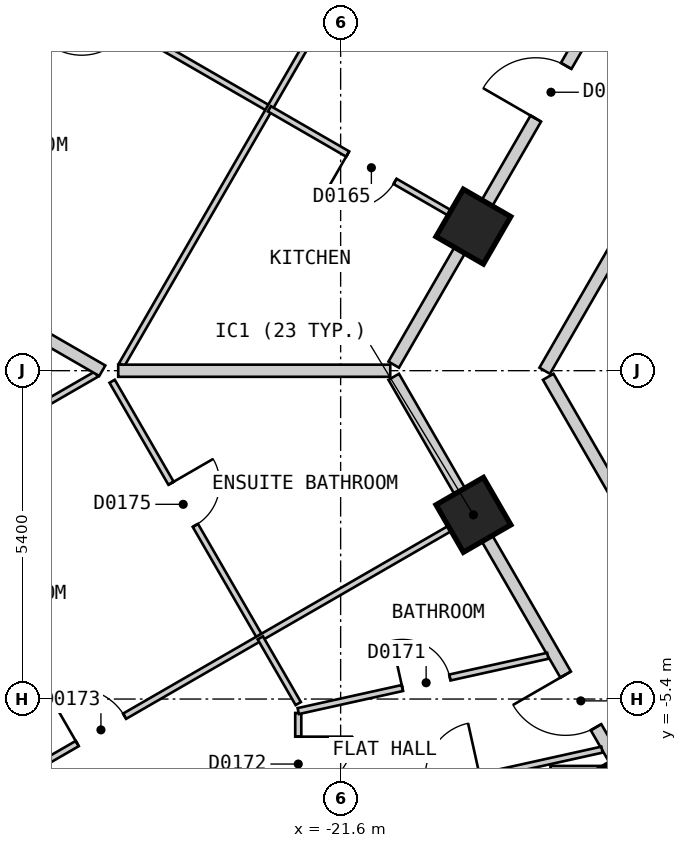
"""IFC4 building model, lengths in metres.
Left out: names, types, materials, properties, quantities, classifications, styles, units other than length and angle.
Written with IfcOpenShell. Run it as: python <this file> out.ifc"""

import sys

from ifc_helpers import new_model, si_unit, direction, frame, frame_2d, origin, origin_2d, place, context, subcontext, project, spatial, polyline, rectangle, outline, extrude, element, fill, save


model = new_model("IFC4")
c1 = context("Model", 3, precision=1e-05, world=origin(), true_north=direction((0.0, 1.0)))
c2 = subcontext(c1, "Body", "Model", "MODEL_VIEW")
j1 = project(units=[si_unit("LENGTHUNIT", "METRE"), si_unit("PLANEANGLEUNIT", "RADIAN")], contexts=[c1])
p1 = place(None, origin())
s1 = spatial("IfcSite", under=j1, at=p1, CompositionType="ELEMENT")
p2 = place(p1, origin())
s2 = spatial("IfcBuilding", under=s1, at=p2, CompositionType="ELEMENT")
p3 = place(p2, frame((0.0, 0.0, 29.4)))
s3 = spatial("IfcBuildingStorey", under=s2, at=p3, CompositionType="ELEMENT", Elevation=29.4)
for number, where, z_axis, x_axis in (
    (1, (-19.416, -2.371, 0.0), (0.0, 0.0, 1.0), (0.5, -0.866, 0.0)),
    (2, (-16.864, -6.791, 0.0), (0.0, 0.0, 1.0), (0.5, -0.866, 0.0)),
    (3, (-19.417, 2.369, 0.0), (0.0, 0.0, 1.0), (-0.5, -0.866, 0.0)),
):
    element("IfcColumn", number, at=place(p3, frame(where, z_axis=z_axis, x_axis=x_axis)), inside=s3, PredefinedType="COLUMN", context=c2, shape_type="SweptSolid", body=[
        extrude(rectangle(XDim=0.9, YDim=0.9, at=origin_2d()), origin(), (0.0, 0.0, 1.0), 3.0),
    ])
p4 = place(p3, frame((-17.71, 25.825, 0.0), z_axis=(0.0, 0.0, 1.0), x_axis=(-0.500001938803, -0.866024284413, 0.0)))
e4 = element("IfcWall", 4, at=p4, inside=s3, PredefinedType="SOLIDWALL", context=c2, shape_type="SweptSolid", body=[
    extrude(outline(polyline([(0.0, -0.15), (27.02, -0.15), (26.94, 0.15), (0.08, 0.15), (0.0, -0.15)])), origin(), (0.0, 0.0, 1.0), 2.7),
])
p5 = place(p4, frame((1.277, 0.0, 0.15)))
e5 = element("IfcOpeningElement", 5, at=p5, cuts=e4, PredefinedType="OPENING", context=c2, shape_type="SweptSolid", body=[
    extrude(rectangle(XDim=1.5, YDim=2.1, at=frame_2d((0.75, 1.05))), frame((0.0, 0.16, 0.0), z_axis=(0.0, -1.0, 0.0), x_axis=(1.0, 0.0, 0.0)), (0.0, 0.0, 1.0), 0.32),
])
p6 = place(p4, frame((3.829, 0.0, 0.15)))
e6 = element("IfcOpeningElement", 6, at=p6, cuts=e4, PredefinedType="OPENING", context=c2, shape_type="SweptSolid", body=[
    extrude(rectangle(XDim=1.5, YDim=2.1, at=frame_2d((0.75, 1.05))), frame((0.0, 0.16, 0.0), z_axis=(0.0, -1.0, 0.0), x_axis=(1.0, 0.0, 0.0)), (0.0, 0.0, 1.0), 0.32),
])
p7 = place(p4, frame((6.382, 0.0, 0.15)))
e7 = element("IfcOpeningElement", 7, at=p7, cuts=e4, PredefinedType="OPENING", context=c2, shape_type="SweptSolid", body=[
    extrude(rectangle(XDim=1.5, YDim=2.1, at=frame_2d((0.75, 1.05))), frame((0.0, 0.16, 0.0), z_axis=(0.0, -1.0, 0.0), x_axis=(1.0, 0.0, 0.0)), (0.0, 0.0, 1.0), 0.32),
])
p8 = place(p4, frame((8.933, 0.0, 0.15)))
e8 = element("IfcOpeningElement", 8, at=p8, cuts=e4, PredefinedType="OPENING", context=c2, shape_type="SweptSolid", body=[
    extrude(rectangle(XDim=1.5, YDim=2.1, at=frame_2d((0.75, 1.05))), frame((0.0, 0.16, 0.0), z_axis=(0.0, -1.0, 0.0), x_axis=(1.0, 0.0, 0.0)), (0.0, 0.0, 1.0), 0.32),
])
p9 = place(p4, frame((11.485, 0.0, 0.15)))
e9 = element("IfcOpeningElement", 9, at=p9, cuts=e4, PredefinedType="OPENING", context=c2, shape_type="SweptSolid", body=[
    extrude(rectangle(XDim=1.5, YDim=2.1, at=frame_2d((0.75, 1.05))), frame((0.0, 0.16, 0.0), z_axis=(0.0, -1.0, 0.0), x_axis=(1.0, 0.0, 0.0)), (0.0, 0.0, 1.0), 0.32),
])
p10 = place(p4, frame((14.037, 0.0, 0.15)))
e10 = element("IfcOpeningElement", 10, at=p10, cuts=e4, PredefinedType="OPENING", context=c2, shape_type="SweptSolid", body=[
    extrude(rectangle(XDim=1.5, YDim=2.1, at=frame_2d((0.75, 1.05))), frame((0.0, 0.16, 0.0), z_axis=(0.0, -1.0, 0.0), x_axis=(1.0, 0.0, 0.0)), (0.0, 0.0, 1.0), 0.32),
])
p11 = place(p4, frame((16.589, 0.0, 0.15)))
e11 = element("IfcOpeningElement", 11, at=p11, cuts=e4, PredefinedType="OPENING", context=c2, shape_type="SweptSolid", body=[
    extrude(rectangle(XDim=1.5, YDim=2.1, at=frame_2d((0.75, 1.05))), frame((0.0, 0.16, 0.0), z_axis=(0.0, -1.0, 0.0), x_axis=(1.0, 0.0, 0.0)), (0.0, 0.0, 1.0), 0.32),
])
p12 = place(p4, frame((19.141, 0.0, 0.15)))
e12 = element("IfcOpeningElement", 12, at=p12, cuts=e4, PredefinedType="OPENING", context=c2, shape_type="SweptSolid", body=[
    extrude(rectangle(XDim=1.5, YDim=2.1, at=frame_2d((0.75, 1.05))), frame((0.0, 0.16, 0.0), z_axis=(0.0, -1.0, 0.0), x_axis=(1.0, 0.0, 0.0)), (0.0, 0.0, 1.0), 0.32),
])
p13 = place(p4, frame((21.693, 0.0, 0.15)))
e13 = element("IfcOpeningElement", 13, at=p13, cuts=e4, PredefinedType="OPENING", context=c2, shape_type="SweptSolid", body=[
    extrude(rectangle(XDim=1.5, YDim=2.1, at=frame_2d((0.75, 1.05))), frame((0.0, 0.16, 0.0), z_axis=(0.0, -1.0, 0.0), x_axis=(1.0, 0.0, 0.0)), (0.0, 0.0, 1.0), 0.32),
])
p14 = place(p4, frame((24.244, 0.0, 0.15)))
e14 = element("IfcOpeningElement", 14, at=p14, cuts=e4, PredefinedType="OPENING", context=c2, shape_type="SweptSolid", body=[
    extrude(rectangle(XDim=1.5, YDim=2.1, at=frame_2d((0.75, 1.05))), frame((0.0, 0.16, 0.0), z_axis=(0.0, -1.0, 0.0), x_axis=(1.0, 0.0, 0.0)), (0.0, 0.0, 1.0), 0.32),
])
p15 = place(p3, frame((-31.22, -2.425, 0.0), z_axis=(0.0, 0.0, 1.0), x_axis=(0.500001938803, -0.866024284413, 0.0)))
e15 = element("IfcWall", 15, at=p15, inside=s3, PredefinedType="SOLIDWALL", context=c2, shape_type="SweptSolid", body=[
    extrude(outline(polyline([(0.0, -0.15), (27.02, -0.15), (26.94, 0.15), (0.08, 0.15), (0.0, -0.15)])), origin(), (0.0, 0.0, 1.0), 2.7),
])
p16 = place(p15, frame((1.277, 0.0, 0.15)))
e16 = element("IfcOpeningElement", 16, at=p16, cuts=e15, PredefinedType="OPENING", context=c2, shape_type="SweptSolid", body=[
    extrude(rectangle(XDim=1.5, YDim=2.1, at=frame_2d((0.75, 1.05))), frame((0.0, 0.16, 0.0), z_axis=(0.0, -1.0, 0.0), x_axis=(1.0, 0.0, 0.0)), (0.0, 0.0, 1.0), 0.32),
])
p17 = place(p15, frame((3.829, 0.0, 0.15)))
e17 = element("IfcOpeningElement", 17, at=p17, cuts=e15, PredefinedType="OPENING", context=c2, shape_type="SweptSolid", body=[
    extrude(rectangle(XDim=1.5, YDim=2.1, at=frame_2d((0.75, 1.05))), frame((0.0, 0.16, 0.0), z_axis=(0.0, -1.0, 0.0), x_axis=(1.0, 0.0, 0.0)), (0.0, 0.0, 1.0), 0.32),
])
p18 = place(p15, frame((6.382, 0.0, 0.15)))
e18 = element("IfcOpeningElement", 18, at=p18, cuts=e15, PredefinedType="OPENING", context=c2, shape_type="SweptSolid", body=[
    extrude(rectangle(XDim=1.5, YDim=2.1, at=frame_2d((0.75, 1.05))), frame((0.0, 0.16, 0.0), z_axis=(0.0, -1.0, 0.0), x_axis=(1.0, 0.0, 0.0)), (0.0, 0.0, 1.0), 0.32),
])
p19 = place(p15, frame((8.933, 0.0, 0.15)))
e19 = element("IfcOpeningElement", 19, at=p19, cuts=e15, PredefinedType="OPENING", context=c2, shape_type="SweptSolid", body=[
    extrude(rectangle(XDim=1.5, YDim=2.1, at=frame_2d((0.75, 1.05))), frame((0.0, 0.16, 0.0), z_axis=(0.0, -1.0, 0.0), x_axis=(1.0, 0.0, 0.0)), (0.0, 0.0, 1.0), 0.32),
])
p20 = place(p15, frame((11.485, 0.0, 0.15)))
e20 = element("IfcOpeningElement", 20, at=p20, cuts=e15, PredefinedType="OPENING", context=c2, shape_type="SweptSolid", body=[
    extrude(rectangle(XDim=1.5, YDim=2.1, at=frame_2d((0.75, 1.05))), frame((0.0, 0.16, 0.0), z_axis=(0.0, -1.0, 0.0), x_axis=(1.0, 0.0, 0.0)), (0.0, 0.0, 1.0), 0.32),
])
p21 = place(p15, frame((14.037, 0.0, 0.15)))
e21 = element("IfcOpeningElement", 21, at=p21, cuts=e15, PredefinedType="OPENING", context=c2, shape_type="SweptSolid", body=[
    extrude(rectangle(XDim=1.5, YDim=2.1, at=frame_2d((0.75, 1.05))), frame((0.0, 0.16, 0.0), z_axis=(0.0, -1.0, 0.0), x_axis=(1.0, 0.0, 0.0)), (0.0, 0.0, 1.0), 0.32),
])
p22 = place(p15, frame((16.589, 0.0, 0.15)))
e22 = element("IfcOpeningElement", 22, at=p22, cuts=e15, PredefinedType="OPENING", context=c2, shape_type="SweptSolid", body=[
    extrude(rectangle(XDim=1.5, YDim=2.1, at=frame_2d((0.75, 1.05))), frame((0.0, 0.16, 0.0), z_axis=(0.0, -1.0, 0.0), x_axis=(1.0, 0.0, 0.0)), (0.0, 0.0, 1.0), 0.32),
])
p23 = place(p15, frame((19.141, 0.0, 0.15)))
e23 = element("IfcOpeningElement", 23, at=p23, cuts=e15, PredefinedType="OPENING", context=c2, shape_type="SweptSolid", body=[
    extrude(rectangle(XDim=1.5, YDim=2.1, at=frame_2d((0.75, 1.05))), frame((0.0, 0.16, 0.0), z_axis=(0.0, -1.0, 0.0), x_axis=(1.0, 0.0, 0.0)), (0.0, 0.0, 1.0), 0.32),
])
p24 = place(p15, frame((21.693, 0.0, 0.15)))
e24 = element("IfcOpeningElement", 24, at=p24, cuts=e15, PredefinedType="OPENING", context=c2, shape_type="SweptSolid", body=[
    extrude(rectangle(XDim=1.5, YDim=2.1, at=frame_2d((0.75, 1.05))), frame((0.0, 0.16, 0.0), z_axis=(0.0, -1.0, 0.0), x_axis=(1.0, 0.0, 0.0)), (0.0, 0.0, 1.0), 0.32),
])
p25 = place(p15, frame((24.244, 0.0, 0.15)))
e25 = element("IfcOpeningElement", 25, at=p25, cuts=e15, PredefinedType="OPENING", context=c2, shape_type="SweptSolid", body=[
    extrude(rectangle(XDim=1.5, YDim=2.1, at=frame_2d((0.75, 1.05))), frame((0.0, 0.16, 0.0), z_axis=(0.0, -1.0, 0.0), x_axis=(1.0, 0.0, 0.0)), (0.0, 0.0, 1.0), 0.32),
])
p26 = place(p3, frame((-18.186, -0.101, 0.0), z_axis=(0.0, 0.0, 1.0), x_axis=(0.499997591167, -0.86602679452, 0.0)))
e26 = element("IfcWall", 26, at=p26, inside=s3, PredefinedType="PARTITIONING", context=c2, shape_type="SweptSolid", body=[
    extrude(rectangle(XDim=5.172, YDim=0.2, at=frame_2d((2.586, 0.0))), origin(), (0.0, 0.0, 1.0), 2.7),
])
p27 = place(p3, frame((-20.727, -0.101, 0.0), z_axis=(0.0, 0.0, 1.0), x_axis=(0.500065652488, -0.865987495984, 0.0)))
e27 = element("IfcWall", 27, at=p27, inside=s3, PredefinedType="PARTITIONING", context=c2, shape_type="SweptSolid", body=[
    extrude(rectangle(XDim=7.389, YDim=0.2, at=frame_2d((3.695, 0.0))), origin(), (0.0, 0.0, 1.0), 2.7),
])
p28 = place(p27, frame((5.654, 0.0, 0.0)))
e28 = element("IfcOpeningElement", 28, at=p28, cuts=e27, PredefinedType="OPENING", context=c2, shape_type="SweptSolid", body=[
    extrude(rectangle(XDim=1.0, YDim=2.1, at=frame_2d((0.5, 1.05))), frame((0.0, 0.11, 0.0), z_axis=(0.0, -1.0, 0.0), x_axis=(1.0, 0.0, 0.0)), (0.0, 0.0, 1.0), 0.22),
])
p29 = place(p3, frame((-18.15, -6.6, 0.0), z_axis=(0.0, 0.0, 1.0), x_axis=(1.0, 0.0, 0.0)))
e29 = element("IfcWall", 29, at=p29, inside=s3, PredefinedType="PARTITIONING", context=c2, shape_type="SweptSolid", body=[
    extrude(rectangle(XDim=1.176, YDim=0.2, at=frame_2d((0.588, 0.0))), origin(), (0.0, 0.0, 1.0), 2.7),
])
p30 = place(p3, frame((-18.244, -0.001, 0.0), z_axis=(0.0, 0.0, 1.0), x_axis=(0.499962999376, 0.866046765051, 0.0)))
e30 = element("IfcWall", 30, at=p30, inside=s3, PredefinedType="PARTITIONING", context=c2, shape_type="SweptSolid", body=[
    extrude(rectangle(XDim=18.245, YDim=0.2, at=frame_2d((9.123, 0.0))), origin(), (0.0, 0.0, 1.0), 2.7),
])
p31 = place(p30, frame((8.672, 0.0, 0.0)))
e31 = element("IfcOpeningElement", 31, at=p31, cuts=e30, PredefinedType="OPENING", context=c2, shape_type="SweptSolid", body=[
    extrude(rectangle(XDim=0.9, YDim=2.1, at=frame_2d((0.45, 1.05))), frame((0.0, 0.11, 0.0), z_axis=(0.0, -1.0, 0.0), x_axis=(1.0, 0.0, 0.0)), (0.0, 0.0, 1.0), 0.22),
])
p32 = place(p3, frame((-20.727, 0.099, 0.0), z_axis=(0.0, 0.0, 1.0), x_axis=(0.499993204491, 0.866029327138, 0.0)))
e32 = element("IfcWall", 32, at=p32, inside=s3, PredefinedType="PARTITIONING", context=c2, shape_type="SweptSolid", body=[
    extrude(rectangle(XDim=20.554, YDim=0.2, at=frame_2d((10.277, 0.0))), origin(), (0.0, 0.0, 1.0), 2.7),
])
p33 = place(p32, frame((14.88, 0.0, 0.0)))
e33 = element("IfcOpeningElement", 33, at=p33, cuts=e32, PredefinedType="OPENING", context=c2, shape_type="SweptSolid", body=[
    extrude(rectangle(XDim=1.0, YDim=2.1, at=frame_2d((0.5, 1.05))), frame((0.0, 0.11, 0.0), z_axis=(0.0, -1.0, 0.0), x_axis=(1.0, 0.0, 0.0)), (0.0, 0.0, 1.0), 0.22),
])
p34 = place(p32, frame((4.673, 0.0, 0.0)))
e34 = element("IfcOpeningElement", 34, at=p34, cuts=e32, PredefinedType="OPENING", context=c2, shape_type="SweptSolid", body=[
    extrude(rectangle(XDim=1.0, YDim=2.1, at=frame_2d((0.5, 1.05))), frame((0.0, 0.11, 0.0), z_axis=(0.0, -1.0, 0.0), x_axis=(1.0, 0.0, 0.0)), (0.0, 0.0, 1.0), 0.22),
])
p35 = place(p3, frame((-25.358, -0.174, 0.0), z_axis=(0.0, 0.0, 1.0), x_axis=(0.500093956194, -0.865971151354, 0.0)))
e35 = element("IfcWall", 35, at=p35, inside=s3, PredefinedType="PARTITIONING", context=c2, shape_type="SweptSolid", body=[
    extrude(rectangle(XDim=4.873, YDim=0.1, at=frame_2d((2.437, 0.0))), origin(), (0.0, 0.0, 1.0), 2.7),
])
p36 = place(p35, frame((1.937, 0.0, 0.0)))
e36 = element("IfcOpeningElement", 36, at=p36, cuts=e35, PredefinedType="OPENING", context=c2, shape_type="SweptSolid", body=[
    extrude(rectangle(XDim=0.8, YDim=2.1, at=frame_2d((0.4, 1.05))), frame((0.0, 0.06, 0.0), z_axis=(0.0, -1.0, 0.0), x_axis=(1.0, 0.0, 0.0)), (0.0, 0.0, 1.0), 0.12),
])
p37 = place(p3, frame((-28.164, 7.419, 0.0), z_axis=(0.0, 0.0, 1.0), x_axis=(0.86607068519, -0.499921562103, 0.0)))
e37 = element("IfcWall", 37, at=p37, inside=s3, PredefinedType="PARTITIONING", context=c2, shape_type="SweptSolid", body=[
    extrude(rectangle(XDim=6.227, YDim=0.1, at=frame_2d((3.114, 0.0))), origin(), (0.0, 0.0, 1.0), 2.7),
])
p38 = place(p37, frame((2.663, 0.0, 0.0)))
e38 = element("IfcOpeningElement", 38, at=p38, cuts=e37, PredefinedType="OPENING", context=c2, shape_type="SweptSolid", body=[
    extrude(rectangle(XDim=0.9, YDim=2.1, at=frame_2d((0.45, 1.05))), frame((0.0, 0.06, 0.0), z_axis=(0.0, -1.0, 0.0), x_axis=(1.0, 0.0, 0.0)), (0.0, 0.0, 1.0), 0.12),
])
p39 = place(p3, frame((-25.2, 0.099, 0.0), z_axis=(0.0, 0.0, 1.0), x_axis=(0.49997477318, 0.866039968006, 0.0)))
e39 = element("IfcWall", 39, at=p39, inside=s3, PredefinedType="PARTITIONING", context=c2, shape_type="SweptSolid", body=[
    extrude(rectangle(XDim=14.965, YDim=0.1, at=frame_2d((7.482, 0.0))), origin(), (0.0, 0.0, 1.0), 2.7),
])
p40 = place(p39, frame((6.96, 0.0, 0.0)))
e40 = element("IfcOpeningElement", 40, at=p40, cuts=e39, PredefinedType="OPENING", context=c2, shape_type="SweptSolid", body=[
    extrude(rectangle(XDim=0.9, YDim=2.1, at=frame_2d((0.45, 1.05))), frame((0.0, 0.06, 0.0), z_axis=(0.0, -1.0, 0.0), x_axis=(1.0, 0.0, 0.0)), (0.0, 0.0, 1.0), 0.12),
])
p41 = place(p3, frame((-22.297, -9.813, 0.0), z_axis=(0.0, 0.0, 1.0), x_axis=(0.0, 1.0, 0.0)))
e41 = element("IfcWall", 41, at=p41, inside=s3, PredefinedType="PARTITIONING", context=c2, shape_type="SweptSolid", body=[
    extrude(rectangle(XDim=4.184, YDim=0.1, at=frame_2d((2.092, 0.0))), origin(), (0.0, 0.0, 1.0), 2.7),
])
p42 = place(p41, frame((2.894, 0.0, 0.0)))
e42 = element("IfcOpeningElement", 42, at=p42, cuts=e41, PredefinedType="OPENING", context=c2, shape_type="SweptSolid", body=[
    extrude(rectangle(XDim=0.9, YDim=2.1, at=frame_2d((0.45, 1.05))), frame((0.0, 0.06, 0.0), z_axis=(0.0, -1.0, 0.0), x_axis=(1.0, 0.0, 0.0)), (0.0, 0.0, 1.0), 0.12),
])
p43 = place(p3, frame((-22.297, -5.598, 0.0), z_axis=(0.0, 0.0, 1.0), x_axis=(0.976341239907, 0.216235481033, 0.0)))
e43 = element("IfcWall", 43, at=p43, inside=s3, PredefinedType="PARTITIONING", context=c2, shape_type="SweptSolid", body=[
    extrude(rectangle(XDim=4.203, YDim=0.1, at=frame_2d((2.102, 0.0))), origin(), (0.0, 0.0, 1.0), 2.7),
])
p44 = place(p43, frame((1.754, 0.0, 0.0)))
e44 = element("IfcOpeningElement", 44, at=p44, cuts=e43, PredefinedType="OPENING", context=c2, shape_type="SweptSolid", body=[
    extrude(rectangle(XDim=0.8, YDim=2.1, at=frame_2d((0.4, 1.05))), frame((0.0, 0.06, 0.0), z_axis=(0.0, -1.0, 0.0), x_axis=(1.0, 0.0, 0.0)), (0.0, 0.0, 1.0), 0.12),
])
p45 = place(p3, frame((-22.247, -7.328, 0.0), z_axis=(0.0, 0.0, 1.0), x_axis=(0.976310522972, 0.216374126765, 0.0)))
e45 = element("IfcWall", 45, at=p45, inside=s3, PredefinedType="PARTITIONING", context=c2, shape_type="SweptSolid", body=[
    extrude(rectangle(XDim=5.065, YDim=0.1, at=frame_2d((2.532, 0.0))), origin(), (0.0, 0.0, 1.0), 2.7),
])
p46 = place(p45, frame((2.109, 0.0, 0.0)))
e46 = element("IfcOpeningElement", 46, at=p46, cuts=e45, PredefinedType="OPENING", context=c2, shape_type="SweptSolid", body=[
    extrude(rectangle(XDim=0.9, YDim=2.1, at=frame_2d((0.45, 1.05))), frame((0.0, 0.06, 0.0), z_axis=(0.0, -1.0, 0.0), x_axis=(1.0, 0.0, 0.0)), (0.0, 0.0, 1.0), 0.12),
])
p47 = place(p3, frame((-28.163, -7.42, 0.0), z_axis=(0.0, 0.0, 1.0), x_axis=(0.866065245018, 0.499930986609, 0.0)))
e47 = element("IfcWall", 47, at=p47, inside=s3, PredefinedType="PARTITIONING", context=c2, shape_type="SweptSolid", body=[
    extrude(rectangle(XDim=10.0, YDim=0.1, at=frame_2d((5.0, 0.0))), origin(), (0.0, 0.0, 1.0), 2.7),
])
p48 = place(p47, frame((2.576, 0.0, 0.0)))
e48 = element("IfcOpeningElement", 48, at=p48, cuts=e47, PredefinedType="OPENING", context=c2, shape_type="SweptSolid", body=[
    extrude(rectangle(XDim=0.9, YDim=2.1, at=frame_2d((0.45, 1.05))), frame((0.0, 0.06, 0.0), z_axis=(0.0, -1.0, 0.0), x_axis=(1.0, 0.0, 0.0)), (0.0, 0.0, 1.0), 0.12),
])
p49 = place(p3, frame((-30.715, -3.0, 0.0), z_axis=(0.0, 0.0, 1.0), x_axis=(0.866054318203, 0.499949915414, 0.0)))
e49 = element("IfcWall", 49, at=p49, inside=s3, PredefinedType="PARTITIONING", context=c2, shape_type="SweptSolid", body=[
    extrude(rectangle(XDim=5.884, YDim=0.1, at=frame_2d((2.942, 0.0))), origin(), (0.0, 0.0, 1.0), 2.7),
])
p50 = place(p49, frame((2.55, 0.0, 0.0)))
e50 = element("IfcOpeningElement", 50, at=p50, cuts=e49, PredefinedType="OPENING", context=c2, shape_type="SweptSolid", body=[
    extrude(rectangle(XDim=0.9, YDim=2.1, at=frame_2d((0.45, 1.05))), frame((0.0, 0.06, 0.0), z_axis=(0.0, -1.0, 0.0), x_axis=(1.0, 0.0, 0.0)), (0.0, 0.0, 1.0), 0.12),
])
p51 = place(p3, frame((-30.716, 2.999, 0.0), z_axis=(0.0, 0.0, 1.0), x_axis=(0.866020924479, -0.500007758305, 0.0)))
e51 = element("IfcWall", 51, at=p51, inside=s3, PredefinedType="PARTITIONING", context=c2, shape_type="SweptSolid", body=[
    extrude(rectangle(XDim=6.0, YDim=0.2, at=frame_2d((3.0, 0.0))), origin(), (0.0, 0.0, 1.0), 2.7),
])
p52 = place(p3, frame((-25.258, -0.001, 0.0), z_axis=(0.0, 0.0, 1.0), x_axis=(1.0, 0.0, 0.0)))
e52 = element("IfcWall", 52, at=p52, inside=s3, PredefinedType="PARTITIONING", context=c2, shape_type="SweptSolid", body=[
    extrude(rectangle(XDim=4.474, YDim=0.2, at=frame_2d((2.237, 0.0))), origin(), (0.0, 0.0, 1.0), 2.7),
])
p53 = place(p3, frame((-22.921, -4.394, 0.0), z_axis=(0.0, 0.0, 1.0), x_axis=(0.49977889874, -0.86615301903, 0.0)))
e53 = element("IfcWall", 53, at=p53, inside=s3, PredefinedType="PARTITIONING", context=c2, shape_type="SweptSolid", body=[
    extrude(rectangle(XDim=1.248, YDim=0.1, at=frame_2d((0.624, 0.0))), origin(), (0.0, 0.0, 1.0), 2.7),
])
p54 = place(p3, frame((-22.771, 4.306, 0.0), z_axis=(0.0, 0.0, 1.0), x_axis=(0.866008894869, -0.50002859319, 0.0)))
e54 = element("IfcWall", 54, at=p54, inside=s3, PredefinedType="PARTITIONING", context=c2, shape_type="SweptSolid", body=[
    extrude(rectangle(XDim=3.774, YDim=0.1, at=frame_2d((1.887, 0.0))), origin(), (0.0, 0.0, 1.0), 2.7),
])
p55 = place(p54, frame((1.486, 0.0, 0.0)))
e55 = element("IfcOpeningElement", 55, at=p55, cuts=e54, PredefinedType="OPENING", context=c2, shape_type="SweptSolid", body=[
    extrude(rectangle(XDim=0.9, YDim=2.1, at=frame_2d((0.45, 1.05))), frame((0.0, 0.06, 0.0), z_axis=(0.0, -1.0, 0.0), x_axis=(1.0, 0.0, 0.0)), (0.0, 0.0, 1.0), 0.12),
])
p56 = place(p34, origin())
e56 = element("IfcDoor", 56, at=p56, inside=s3, OperationType="SINGLE_SWING_LEFT", PredefinedType="DOOR", context=c2, shape_type="SweptSolid", body=[
    extrude(rectangle(XDim=1.0, YDim=2.1, at=frame_2d((0.5, 1.05))), frame((0.0, 0.025, 0.0), z_axis=(0.0, -1.0, 0.0), x_axis=(1.0, 0.0, 0.0)), (0.0, 0.0, 1.0), 0.05),
])
fill(e34, e56)
p57 = place(p55, origin())
e57 = element("IfcDoor", 57, at=p57, inside=s3, OperationType="SINGLE_SWING_LEFT", PredefinedType="DOOR", context=c2, shape_type="SweptSolid", body=[
    extrude(rectangle(XDim=0.9, YDim=2.1, at=frame_2d((0.45, 1.05))), frame((0.0, 0.025, 0.0), z_axis=(0.0, -1.0, 0.0), x_axis=(1.0, 0.0, 0.0)), (0.0, 0.0, 1.0), 0.05),
])
fill(e55, e57)
p58 = place(p28, origin())
e58 = element("IfcDoor", 58, at=p58, inside=s3, OperationType="SINGLE_SWING_LEFT", PredefinedType="DOOR", context=c2, shape_type="SweptSolid", body=[
    extrude(rectangle(XDim=1.0, YDim=2.1, at=frame_2d((0.5, 1.05))), frame((0.0, 0.025, 0.0), z_axis=(0.0, -1.0, 0.0), x_axis=(1.0, 0.0, 0.0)), (0.0, 0.0, 1.0), 0.05),
])
fill(e28, e58)
p59 = place(p44, origin())
e59 = element("IfcDoor", 59, at=p59, inside=s3, OperationType="SINGLE_SWING_LEFT", PredefinedType="DOOR", context=c2, shape_type="SweptSolid", body=[
    extrude(rectangle(XDim=0.8, YDim=2.1, at=frame_2d((0.4, 1.05))), frame((0.0, 0.025, 0.0), z_axis=(0.0, -1.0, 0.0), x_axis=(1.0, 0.0, 0.0)), (0.0, 0.0, 1.0), 0.05),
])
fill(e44, e59)
p60 = place(p42, origin())
e60 = element("IfcDoor", 60, at=p60, inside=s3, OperationType="SINGLE_SWING_RIGHT", PredefinedType="DOOR", context=c2, shape_type="SweptSolid", body=[
    extrude(rectangle(XDim=0.9, YDim=2.1, at=frame_2d((0.45, 1.05))), frame((0.0, 0.025, 0.0), z_axis=(0.0, -1.0, 0.0), x_axis=(1.0, 0.0, 0.0)), (0.0, 0.0, 1.0), 0.05),
])
fill(e42, e60)
p61 = place(p48, origin())
e61 = element("IfcDoor", 61, at=p61, inside=s3, OperationType="SINGLE_SWING_LEFT", PredefinedType="DOOR", context=c2, shape_type="SweptSolid", body=[
    extrude(rectangle(XDim=0.9, YDim=2.1, at=frame_2d((0.45, 1.05))), frame((0.0, 0.025, 0.0), z_axis=(0.0, -1.0, 0.0), x_axis=(1.0, 0.0, 0.0)), (0.0, 0.0, 1.0), 0.05),
])
fill(e48, e61)
p62 = place(p36, origin())
e62 = element("IfcDoor", 62, at=p62, inside=s3, OperationType="SINGLE_SWING_LEFT", PredefinedType="DOOR", context=c2, shape_type="SweptSolid", body=[
    extrude(rectangle(XDim=0.8, YDim=2.1, at=frame_2d((0.4, 1.05))), frame((0.0, 0.025, 0.0), z_axis=(0.0, -1.0, 0.0), x_axis=(1.0, 0.0, 0.0)), (0.0, 0.0, 1.0), 0.05),
])
fill(e36, e62)
save(model, sys.argv[1])
